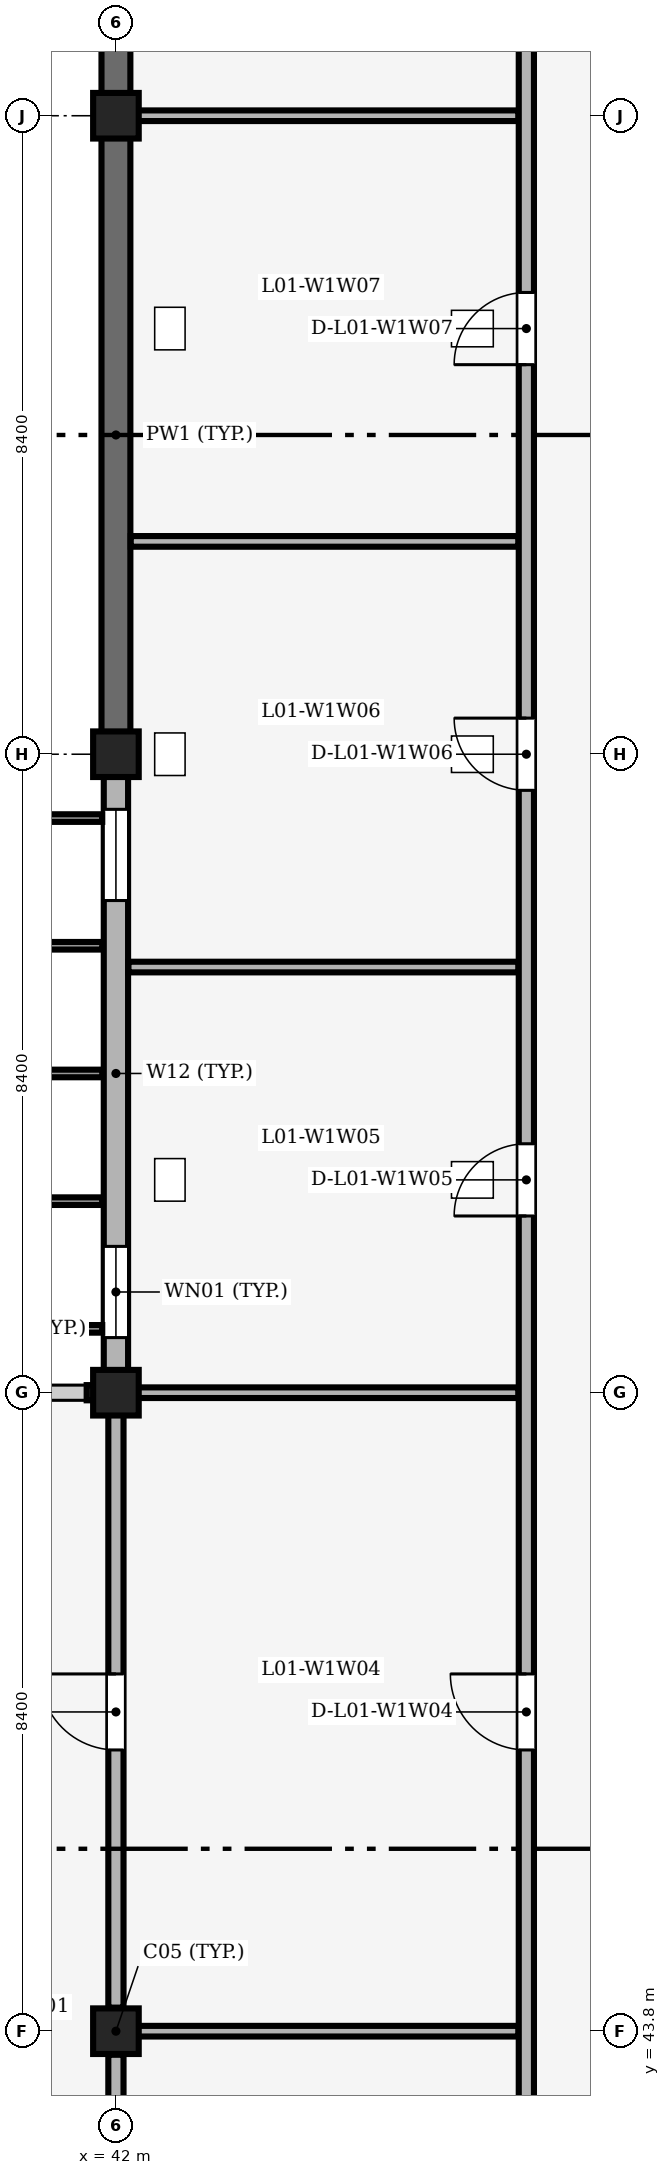
"""IFC4 building model, lengths in metres.
Left out: names, types, materials, properties, quantities, classifications, styles, units other than length and angle.
Written with IfcOpenShell. Run it as: python <this file> out.ifc"""

import sys

from ifc_helpers import new_model, si_unit, direction, frame, frame_2d, origin, origin_2d, place, context, subcontext, project, spatial, rectangle, extrude, element, fill, save


model = new_model("IFC4")
c1 = context("Model", 3, precision=1e-05, world=origin(), true_north=direction((0.0, 1.0)))
c2 = subcontext(c1, "Body", "Model", "MODEL_VIEW")
j1 = project(units=[si_unit("LENGTHUNIT", "METRE"), si_unit("PLANEANGLEUNIT", "RADIAN")], contexts=[c1])
p1 = place(None, origin())
s1 = spatial("IfcSite", under=j1, at=p1, CompositionType="ELEMENT")
p2 = place(p1, origin())
s2 = spatial("IfcBuilding", under=s1, at=p2, CompositionType="ELEMENT")
p3 = place(p2, frame((0.0, 0.0, 4.8)))
s3 = spatial("IfcBuildingStorey", under=s2, at=p3, CompositionType="ELEMENT", Elevation=4.8)
for number, where, z_axis, x_axis in (
    (1, (42.0, 43.8, 0.0), (0.0, 0.0, 1.0), (1.0, 0.0, 0.0)),
    (2, (42.0, 52.2, 0.0), (0.0, 0.0, 1.0), (1.0, 0.0, 0.0)),
    (3, (42.0, 60.6, 0.0), (0.0, 0.0, 1.0), (1.0, 0.0, 0.0)),
    (4, (42.0, 69.0, 0.0), (0.0, 0.0, 1.0), (1.0, 0.0, 0.0)),
):
    element("IfcColumn", number, at=place(p3, frame(where, z_axis=z_axis, x_axis=x_axis)), inside=s3, PredefinedType="COLUMN", context=c2, shape_type="SweptSolid", body=[
        extrude(rectangle(XDim=0.6, YDim=0.6, at=origin_2d()), origin(), (0.0, 0.0, 1.0), 4.2),
    ])
p4 = place(p3, frame((42.0, 52.475, 0.0), z_axis=(0.0, 0.0, 1.0), x_axis=(0.0, 1.0, 0.0)))
e5 = element("IfcWall", 5, at=p4, inside=s3, PredefinedType="SOLIDWALL", context=c2, shape_type="SweptSolid", body=[
    extrude(rectangle(XDim=7.85, YDim=0.32, at=frame_2d((3.925, 0.0))), origin(), (0.0, 0.0, 1.0), 3.352),
])
p5 = place(p4, frame((0.45, 0.0, 0.85)))
e6 = element("IfcOpeningElement", 6, at=p5, cuts=e5, PredefinedType="OPENING", context=c2, shape_type="SweptSolid", body=[
    extrude(rectangle(XDim=1.2, YDim=1.5, at=frame_2d((0.6, 0.75))), frame((0.0, 0.17, 0.0), z_axis=(0.0, -1.0, 0.0), x_axis=(1.0, 0.0, 0.0)), (0.0, 0.0, 1.0), 0.34),
])
p6 = place(p4, frame((6.2, 0.0, 0.85)))
e7 = element("IfcOpeningElement", 7, at=p6, cuts=e5, PredefinedType="OPENING", context=c2, shape_type="SweptSolid", body=[
    extrude(rectangle(XDim=1.2, YDim=1.5, at=frame_2d((0.6, 0.75))), frame((0.0, 0.17, 0.0), z_axis=(0.0, -1.0, 0.0), x_axis=(1.0, 0.0, 0.0)), (0.0, 0.0, 1.0), 0.34),
])
for number, where, z_axis, x_axis in (
    (8, (42.0, 60.875, 0.0), (0.0, 0.0, 1.0), (0.0, 1.0, 0.0)),
    (9, (42.0, 69.275, 0.0), (0.0, 0.0, 1.0), (0.0, 1.0, 0.0)),
):
    element("IfcWall", number, at=place(p3, frame(where, z_axis=z_axis, x_axis=x_axis)), inside=s3, PredefinedType="SHEAR", context=c2, shape_type="SweptSolid", body=[
        extrude(rectangle(XDim=7.85, YDim=0.38, at=frame_2d((3.925, 0.0))), origin(), (0.0, 0.0, 1.0), 3.352),
    ])
p7 = place(p3, frame((42.105, 43.8, 0.0), z_axis=(0.0, 0.0, 1.0), x_axis=(1.0, 0.0, 0.0)))
e10 = element("IfcWall", 10, at=p7, inside=s3, PredefinedType="PARTITIONING", context=c2, shape_type="SweptSolid", body=[
    extrude(rectangle(XDim=5.19, YDim=0.14, at=frame_2d((2.595, 0.0))), origin(), (0.0, 0.0, 1.0), 3.01),
])
p8 = place(p3, frame((42.165, 52.2, 0.0), z_axis=(0.0, 0.0, 1.0), x_axis=(1.0, 0.0, 0.0)))
e11 = element("IfcWall", 11, at=p8, inside=s3, PredefinedType="PARTITIONING", context=c2, shape_type="SweptSolid", body=[
    extrude(rectangle(XDim=5.13, YDim=0.14, at=frame_2d((2.565, 0.0))), origin(), (0.0, 0.0, 1.0), 3.21),
])
p9 = place(p3, frame((42.165, 57.8, 0.0), z_axis=(0.0, 0.0, 1.0), x_axis=(1.0, 0.0, 0.0)))
e12 = element("IfcWall", 12, at=p9, inside=s3, PredefinedType="PARTITIONING", context=c2, shape_type="SweptSolid", body=[
    extrude(rectangle(XDim=5.13, YDim=0.14, at=frame_2d((2.565, 0.0))), origin(), (0.0, 0.0, 1.0), 3.51),
])
p10 = place(p3, frame((42.195, 63.4, 0.0), z_axis=(0.0, 0.0, 1.0), x_axis=(1.0, 0.0, 0.0)))
e13 = element("IfcWall", 13, at=p10, inside=s3, PredefinedType="PARTITIONING", context=c2, shape_type="SweptSolid", body=[
    extrude(rectangle(XDim=5.1, YDim=0.14, at=frame_2d((2.55, 0.0))), origin(), (0.0, 0.0, 1.0), 3.51),
])
p11 = place(p3, frame((42.195, 69.0, 0.0), z_axis=(0.0, 0.0, 1.0), x_axis=(1.0, 0.0, 0.0)))
e14 = element("IfcWall", 14, at=p11, inside=s3, PredefinedType="PARTITIONING", context=c2, shape_type="SweptSolid", body=[
    extrude(rectangle(XDim=5.1, YDim=0.14, at=frame_2d((2.55, 0.0))), origin(), (0.0, 0.0, 1.0), 2.91),
])
p12 = place(p3, frame((47.4, 27.165, 0.0), z_axis=(0.0, 0.0, 1.0), x_axis=(0.0, 1.0, 0.0)))
e15 = element("IfcWall", 15, at=p12, inside=s3, PredefinedType="PARTITIONING", context=c2, shape_type="SweptSolid", body=[
    extrude(rectangle(XDim=58.625, YDim=0.2, at=frame_2d((29.312, 0.0))), origin(), (0.0, 0.0, 1.0), 3.9),
])
p13 = place(p12, frame((0.685, 0.0, 0.0)))
e16 = element("IfcOpeningElement", 16, at=p13, cuts=e15, PredefinedType="OPENING", context=c2, shape_type="SweptSolid", body=[
    extrude(rectangle(XDim=1.5, YDim=2.2, at=frame_2d((0.75, 1.1))), frame((0.0, 0.11, 0.0), z_axis=(0.0, -1.0, 0.0), x_axis=(1.0, 0.0, 0.0)), (0.0, 0.0, 1.0), 0.22),
])
p14 = place(p12, frame((4.935, 0.0, 0.0)))
e17 = element("IfcOpeningElement", 17, at=p14, cuts=e15, PredefinedType="OPENING", context=c2, shape_type="SweptSolid", body=[
    extrude(rectangle(XDim=1.0, YDim=2.15, at=frame_2d((0.5, 1.075))), frame((0.0, 0.11, 0.0), z_axis=(0.0, -1.0, 0.0), x_axis=(1.0, 0.0, 0.0)), (0.0, 0.0, 1.0), 0.22),
])
p15 = place(p12, frame((11.935, 0.0, 0.0)))
e18 = element("IfcOpeningElement", 18, at=p15, cuts=e15, PredefinedType="OPENING", context=c2, shape_type="SweptSolid", body=[
    extrude(rectangle(XDim=1.0, YDim=2.15, at=frame_2d((0.5, 1.075))), frame((0.0, 0.11, 0.0), z_axis=(0.0, -1.0, 0.0), x_axis=(1.0, 0.0, 0.0)), (0.0, 0.0, 1.0), 0.22),
])
p16 = place(p12, frame((20.335, 0.0, 0.0)))
e19 = element("IfcOpeningElement", 19, at=p16, cuts=e15, PredefinedType="OPENING", context=c2, shape_type="SweptSolid", body=[
    extrude(rectangle(XDim=1.0, YDim=2.15, at=frame_2d((0.5, 1.075))), frame((0.0, 0.11, 0.0), z_axis=(0.0, -1.0, 0.0), x_axis=(1.0, 0.0, 0.0)), (0.0, 0.0, 1.0), 0.22),
])
p17 = place(p12, frame((27.36, 0.0, 0.0)))
e20 = element("IfcOpeningElement", 20, at=p17, cuts=e15, PredefinedType="OPENING", context=c2, shape_type="SweptSolid", body=[
    extrude(rectangle(XDim=0.95, YDim=2.2, at=frame_2d((0.475, 1.1))), frame((0.0, 0.11, 0.0), z_axis=(0.0, -1.0, 0.0), x_axis=(1.0, 0.0, 0.0)), (0.0, 0.0, 1.0), 0.22),
])
p18 = place(p12, frame((32.96, 0.0, 0.0)))
e21 = element("IfcOpeningElement", 21, at=p18, cuts=e15, PredefinedType="OPENING", context=c2, shape_type="SweptSolid", body=[
    extrude(rectangle(XDim=0.95, YDim=2.2, at=frame_2d((0.475, 1.1))), frame((0.0, 0.11, 0.0), z_axis=(0.0, -1.0, 0.0), x_axis=(1.0, 0.0, 0.0)), (0.0, 0.0, 1.0), 0.22),
])
p19 = place(p12, frame((38.56, 0.0, 0.0)))
e22 = element("IfcOpeningElement", 22, at=p19, cuts=e15, PredefinedType="OPENING", context=c2, shape_type="SweptSolid", body=[
    extrude(rectangle(XDim=0.95, YDim=2.1, at=frame_2d((0.475, 1.05))), frame((0.0, 0.11, 0.0), z_axis=(0.0, -1.0, 0.0), x_axis=(1.0, 0.0, 0.0)), (0.0, 0.0, 1.0), 0.22),
])
p20 = place(p12, frame((45.535, 0.0, 0.0)))
e23 = element("IfcOpeningElement", 23, at=p20, cuts=e15, PredefinedType="OPENING", context=c2, shape_type="SweptSolid", body=[
    extrude(rectangle(XDim=1.0, YDim=2.15, at=frame_2d((0.5, 1.075))), frame((0.0, 0.11, 0.0), z_axis=(0.0, -1.0, 0.0), x_axis=(1.0, 0.0, 0.0)), (0.0, 0.0, 1.0), 0.22),
])
p21 = place(p12, frame((53.935, 0.0, 0.0)))
e24 = element("IfcOpeningElement", 24, at=p21, cuts=e15, PredefinedType="OPENING", context=c2, shape_type="SweptSolid", body=[
    extrude(rectangle(XDim=1.0, YDim=2.15, at=frame_2d((0.5, 1.075))), frame((0.0, 0.11, 0.0), z_axis=(0.0, -1.0, 0.0), x_axis=(1.0, 0.0, 0.0)), (0.0, 0.0, 1.0), 0.22),
])
p22 = place(p3, frame((42.0, 35.71, 0.0), z_axis=(0.0, 0.0, 1.0), x_axis=(0.0, 1.0, 0.0)))
e25 = element("IfcWall", 25, at=p22, inside=s3, PredefinedType="PARTITIONING", context=c2, shape_type="SweptSolid", body=[
    extrude(rectangle(XDim=7.78, YDim=0.2, at=frame_2d((3.89, 0.0))), origin(), (0.0, 0.0, 1.0), 3.352),
])
p23 = place(p22, frame((3.39, 0.0, 0.0)))
e26 = element("IfcOpeningElement", 26, at=p23, cuts=e25, PredefinedType="OPENING", context=c2, shape_type="SweptSolid", body=[
    extrude(rectangle(XDim=1.0, YDim=2.15, at=frame_2d((0.5, 1.075))), frame((0.0, 0.11, 0.0), z_axis=(0.0, -1.0, 0.0), x_axis=(1.0, 0.0, 0.0)), (0.0, 0.0, 1.0), 0.22),
])
p24 = place(p3, frame((42.0, 44.11, 0.0), z_axis=(0.0, 0.0, 1.0), x_axis=(0.0, 1.0, 0.0)))
e27 = element("IfcWall", 27, at=p24, inside=s3, PredefinedType="PARTITIONING", context=c2, shape_type="SweptSolid", body=[
    extrude(rectangle(XDim=7.985, YDim=0.2, at=frame_2d((3.992, 0.0))), origin(), (0.0, 0.0, 1.0), 3.352),
])
p25 = place(p24, frame((3.39, 0.0, 0.0)))
e28 = element("IfcOpeningElement", 28, at=p25, cuts=e27, PredefinedType="OPENING", context=c2, shape_type="SweptSolid", body=[
    extrude(rectangle(XDim=1.0, YDim=2.15, at=frame_2d((0.5, 1.075))), frame((0.0, 0.11, 0.0), z_axis=(0.0, -1.0, 0.0), x_axis=(1.0, 0.0, 0.0)), (0.0, 0.0, 1.0), 0.22),
])
p26 = place(p5, origin())
e29 = element("IfcWindow", 29, at=p26, inside=s3, PartitioningType="SINGLE_PANEL", PredefinedType="WINDOW", context=c2, shape_type="SweptSolid", body=[
    extrude(rectangle(XDim=1.2, YDim=1.5, at=frame_2d((0.6, 0.75))), frame((0.0, 0.03, 0.0), z_axis=(0.0, -1.0, 0.0), x_axis=(1.0, 0.0, 0.0)), (0.0, 0.0, 1.0), 0.06),
])
fill(e6, e29)
p27 = place(p6, origin())
e30 = element("IfcWindow", 30, at=p27, inside=s3, PartitioningType="SINGLE_PANEL", PredefinedType="WINDOW", context=c2, shape_type="SweptSolid", body=[
    extrude(rectangle(XDim=1.2, YDim=1.5, at=frame_2d((0.6, 0.75))), frame((0.0, 0.03, 0.0), z_axis=(0.0, -1.0, 0.0), x_axis=(1.0, 0.0, 0.0)), (0.0, 0.0, 1.0), 0.06),
])
fill(e7, e30)
p28 = place(p16, origin())
e31 = element("IfcDoor", 31, at=p28, inside=s3, OperationType="SINGLE_SWING_RIGHT", PredefinedType="DOOR", context=c2, shape_type="SweptSolid", body=[
    extrude(rectangle(XDim=1.0, YDim=2.15, at=frame_2d((0.5, 1.075))), frame((0.0, 0.025, 0.0), z_axis=(0.0, -1.0, 0.0), x_axis=(1.0, 0.0, 0.0)), (0.0, 0.0, 1.0), 0.05),
])
fill(e19, e31)
p29 = place(p17, origin())
e32 = element("IfcDoor", 32, at=p29, inside=s3, OperationType="SINGLE_SWING_LEFT", PredefinedType="DOOR", context=c2, shape_type="SweptSolid", body=[
    extrude(rectangle(XDim=0.95, YDim=2.2, at=frame_2d((0.475, 1.1))), frame((0.0, 0.025, 0.0), z_axis=(0.0, -1.0, 0.0), x_axis=(1.0, 0.0, 0.0)), (0.0, 0.0, 1.0), 0.05),
])
fill(e20, e32)
p30 = place(p18, origin())
e33 = element("IfcDoor", 33, at=p30, inside=s3, OperationType="SINGLE_SWING_RIGHT", PredefinedType="DOOR", context=c2, shape_type="SweptSolid", body=[
    extrude(rectangle(XDim=0.95, YDim=2.2, at=frame_2d((0.475, 1.1))), frame((0.0, 0.025, 0.0), z_axis=(0.0, -1.0, 0.0), x_axis=(1.0, 0.0, 0.0)), (0.0, 0.0, 1.0), 0.05),
])
fill(e21, e33)
p31 = place(p19, origin())
e34 = element("IfcDoor", 34, at=p31, inside=s3, OperationType="SINGLE_SWING_LEFT", PredefinedType="DOOR", context=c2, shape_type="SweptSolid", body=[
    extrude(rectangle(XDim=0.95, YDim=2.1, at=frame_2d((0.475, 1.05))), frame((0.0, 0.025, 0.0), z_axis=(0.0, -1.0, 0.0), x_axis=(1.0, 0.0, 0.0)), (0.0, 0.0, 1.0), 0.05),
])
fill(e22, e34)
p32 = place(p25, origin())
e35 = element("IfcDoor", 35, at=p32, inside=s3, OperationType="SINGLE_SWING_RIGHT", PredefinedType="DOOR", context=c2, shape_type="SweptSolid", body=[
    extrude(rectangle(XDim=1.0, YDim=2.15, at=frame_2d((0.5, 1.075))), frame((0.0, 0.025, 0.0), z_axis=(0.0, -1.0, 0.0), x_axis=(1.0, 0.0, 0.0)), (0.0, 0.0, 1.0), 0.05),
])
fill(e28, e35)
save(model, sys.argv[1])
